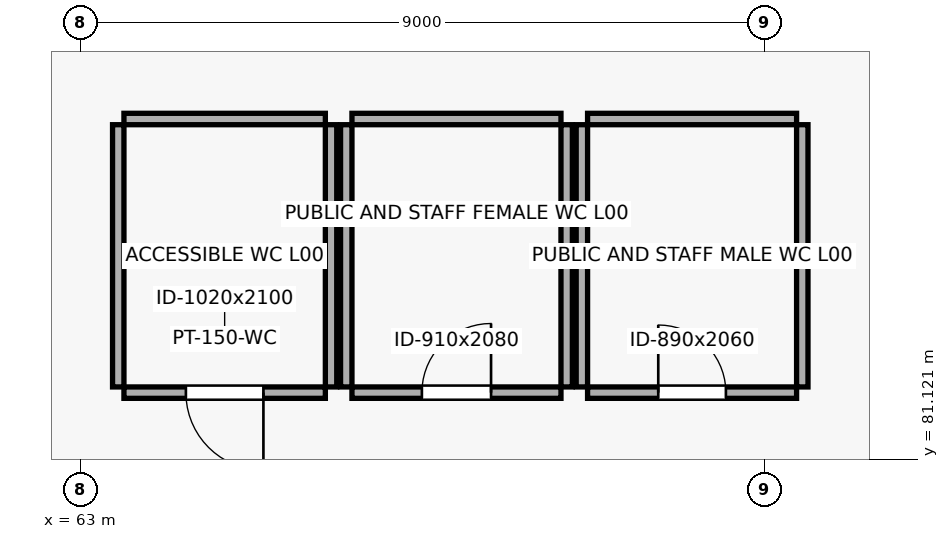
"""IFC4 building model, lengths in metres.
Left out: names, types, materials, properties, quantities, classifications, styles, units other than length and angle.
Written with IfcOpenShell. Run it as: python <this file> out.ifc"""

import sys

from ifc_helpers import new_model, si_unit, direction, frame, frame_2d, origin, place, context, subcontext, project, spatial, rectangle, extrude, element, fill, save


model = new_model("IFC4")
c1 = context("Model", 3, precision=1e-05, world=origin(), true_north=direction((0.0, 1.0)))
c2 = subcontext(c1, "Body", "Model", "MODEL_VIEW")
j1 = project(units=[si_unit("LENGTHUNIT", "METRE"), si_unit("PLANEANGLEUNIT", "RADIAN")], contexts=[c1])
p1 = place(None, origin())
s1 = spatial("IfcSite", under=j1, at=p1, CompositionType="ELEMENT")
p2 = place(p1, origin())
s2 = spatial("IfcBuilding", under=s1, at=p2, CompositionType="ELEMENT")
p3 = place(p2, origin())
s3 = spatial("IfcBuildingStorey", under=s2, at=p3, CompositionType="ELEMENT", Elevation=0.0)
p4 = place(p3, frame((63.575, 82.0, 0.0), z_axis=(0.0, 0.0, 1.0), x_axis=(1.0, 0.0, 0.0)))
e1 = element("IfcWall", 1, at=p4, inside=s3, PredefinedType="PARTITIONING", context=c2, shape_type="SweptSolid", body=[
    extrude(rectangle(XDim=2.65, YDim=0.15, at=frame_2d((1.325, 0.0))), origin(), (0.0, 0.0, 1.0), 3.3),
])
p5 = place(p4, frame((0.815, 0.0, 0.0)))
e2 = element("IfcOpeningElement", 2, at=p5, cuts=e1, PredefinedType="OPENING", context=c2, shape_type="SweptSolid", body=[
    extrude(rectangle(XDim=1.02, YDim=2.1, at=frame_2d((0.51, 1.05))), frame((0.0, 0.087, 0.0), z_axis=(0.0, -1.0, 0.0), x_axis=(1.0, 0.0, 0.0)), (0.0, 0.0, 1.0), 0.174),
])
p6 = place(p3, frame((63.575, 85.6, 0.0), z_axis=(0.0, 0.0, 1.0), x_axis=(1.0, 0.0, 0.0)))
e3 = element("IfcWall", 3, at=p6, inside=s3, PredefinedType="PARTITIONING", context=c2, shape_type="SweptSolid", body=[
    extrude(rectangle(XDim=2.65, YDim=0.15, at=frame_2d((1.325, 0.0))), origin(), (0.0, 0.0, 1.0), 3.3),
])
for number, where, z_axis, x_axis in (
    (4, (63.5, 82.075, 0.0), (0.0, 0.0, 1.0), (0.0, 1.0, 0.0)),
    (5, (66.3, 82.075, 0.0), (0.0, 0.0, 1.0), (0.0, 1.0, 0.0)),
):
    element("IfcWall", number, at=place(p3, frame(where, z_axis=z_axis, x_axis=x_axis)), inside=s3, PredefinedType="PARTITIONING", context=c2, shape_type="SweptSolid", body=[
        extrude(rectangle(XDim=3.45, YDim=0.15, at=frame_2d((1.725, 0.0))), origin(), (0.0, 0.0, 1.0), 3.3),
    ])
p7 = place(p3, frame((66.575, 82.0, 0.0), z_axis=(0.0, 0.0, 1.0), x_axis=(1.0, 0.0, 0.0)))
e6 = element("IfcWall", 6, at=p7, inside=s3, PredefinedType="PARTITIONING", context=c2, shape_type="SweptSolid", body=[
    extrude(rectangle(XDim=2.75, YDim=0.15, at=frame_2d((1.375, 0.0))), origin(), (0.0, 0.0, 1.0), 3.3),
])
p8 = place(p7, frame((0.92, 0.0, 0.0)))
e7 = element("IfcOpeningElement", 7, at=p8, cuts=e6, PredefinedType="OPENING", context=c2, shape_type="SweptSolid", body=[
    extrude(rectangle(XDim=0.91, YDim=2.08, at=frame_2d((0.455, 1.04))), frame((0.0, 0.087, 0.0), z_axis=(0.0, -1.0, 0.0), x_axis=(1.0, 0.0, 0.0)), (0.0, 0.0, 1.0), 0.174),
])
p9 = place(p3, frame((66.575, 85.6, 0.0), z_axis=(0.0, 0.0, 1.0), x_axis=(1.0, 0.0, 0.0)))
e8 = element("IfcWall", 8, at=p9, inside=s3, PredefinedType="PARTITIONING", context=c2, shape_type="SweptSolid", body=[
    extrude(rectangle(XDim=2.75, YDim=0.15, at=frame_2d((1.375, 0.0))), origin(), (0.0, 0.0, 1.0), 3.3),
])
for number, where, z_axis, x_axis in (
    (9, (66.5, 82.075, 0.0), (0.0, 0.0, 1.0), (0.0, 1.0, 0.0)),
    (10, (69.4, 82.075, 0.0), (0.0, 0.0, 1.0), (0.0, 1.0, 0.0)),
):
    element("IfcWall", number, at=place(p3, frame(where, z_axis=z_axis, x_axis=x_axis)), inside=s3, PredefinedType="PARTITIONING", context=c2, shape_type="SweptSolid", body=[
        extrude(rectangle(XDim=3.45, YDim=0.15, at=frame_2d((1.725, 0.0))), origin(), (0.0, 0.0, 1.0), 3.3),
    ])
p10 = place(p3, frame((69.675, 82.0, 0.0), z_axis=(0.0, 0.0, 1.0), x_axis=(1.0, 0.0, 0.0)))
e11 = element("IfcWall", 11, at=p10, inside=s3, PredefinedType="PARTITIONING", context=c2, shape_type="SweptSolid", body=[
    extrude(rectangle(XDim=2.75, YDim=0.15, at=frame_2d((1.375, 0.0))), origin(), (0.0, 0.0, 1.0), 3.3),
])
p11 = place(p10, frame((0.93, 0.0, 0.0)))
e12 = element("IfcOpeningElement", 12, at=p11, cuts=e11, PredefinedType="OPENING", context=c2, shape_type="SweptSolid", body=[
    extrude(rectangle(XDim=0.89, YDim=2.06, at=frame_2d((0.445, 1.03))), frame((0.0, 0.087, 0.0), z_axis=(0.0, -1.0, 0.0), x_axis=(1.0, 0.0, 0.0)), (0.0, 0.0, 1.0), 0.174),
])
p12 = place(p3, frame((69.675, 85.6, 0.0), z_axis=(0.0, 0.0, 1.0), x_axis=(1.0, 0.0, 0.0)))
e13 = element("IfcWall", 13, at=p12, inside=s3, PredefinedType="PARTITIONING", context=c2, shape_type="SweptSolid", body=[
    extrude(rectangle(XDim=2.75, YDim=0.15, at=frame_2d((1.375, 0.0))), origin(), (0.0, 0.0, 1.0), 3.3),
])
for number, where, z_axis, x_axis in (
    (14, (69.6, 82.075, 0.0), (0.0, 0.0, 1.0), (0.0, 1.0, 0.0)),
    (15, (72.5, 82.075, 0.0), (0.0, 0.0, 1.0), (0.0, 1.0, 0.0)),
):
    element("IfcWall", number, at=place(p3, frame(where, z_axis=z_axis, x_axis=x_axis)), inside=s3, PredefinedType="PARTITIONING", context=c2, shape_type="SweptSolid", body=[
        extrude(rectangle(XDim=3.45, YDim=0.15, at=frame_2d((1.725, 0.0))), origin(), (0.0, 0.0, 1.0), 3.3),
    ])
p13 = place(p5, frame((1.02, 0.0, 0.0), z_axis=(0.0, 0.0, 1.0), x_axis=(-1.0, 0.0, 0.0)))
e16 = element("IfcDoor", 16, at=p13, inside=s3, OperationType="SINGLE_SWING_LEFT", PredefinedType="DOOR", context=c2, shape_type="SweptSolid", body=[
    extrude(rectangle(XDim=1.02, YDim=2.1, at=frame_2d((0.51, 1.05))), frame((0.0, 0.025, 0.0), z_axis=(0.0, -1.0, 0.0), x_axis=(1.0, 0.0, 0.0)), (0.0, 0.0, 1.0), 0.05),
])
fill(e2, e16)
p14 = place(p8, origin())
e17 = element("IfcDoor", 17, at=p14, inside=s3, OperationType="SINGLE_SWING_RIGHT", PredefinedType="DOOR", context=c2, shape_type="SweptSolid", body=[
    extrude(rectangle(XDim=0.91, YDim=2.08, at=frame_2d((0.455, 1.04))), frame((0.0, 0.025, 0.0), z_axis=(0.0, -1.0, 0.0), x_axis=(1.0, 0.0, 0.0)), (0.0, 0.0, 1.0), 0.05),
])
fill(e7, e17)
p15 = place(p11, origin())
e18 = element("IfcDoor", 18, at=p15, inside=s3, OperationType="SINGLE_SWING_LEFT", PredefinedType="DOOR", context=c2, shape_type="SweptSolid", body=[
    extrude(rectangle(XDim=0.89, YDim=2.06, at=frame_2d((0.445, 1.03))), frame((0.0, 0.025, 0.0), z_axis=(0.0, -1.0, 0.0), x_axis=(1.0, 0.0, 0.0)), (0.0, 0.0, 1.0), 0.05),
])
fill(e12, e18)
save(model, sys.argv[1])
